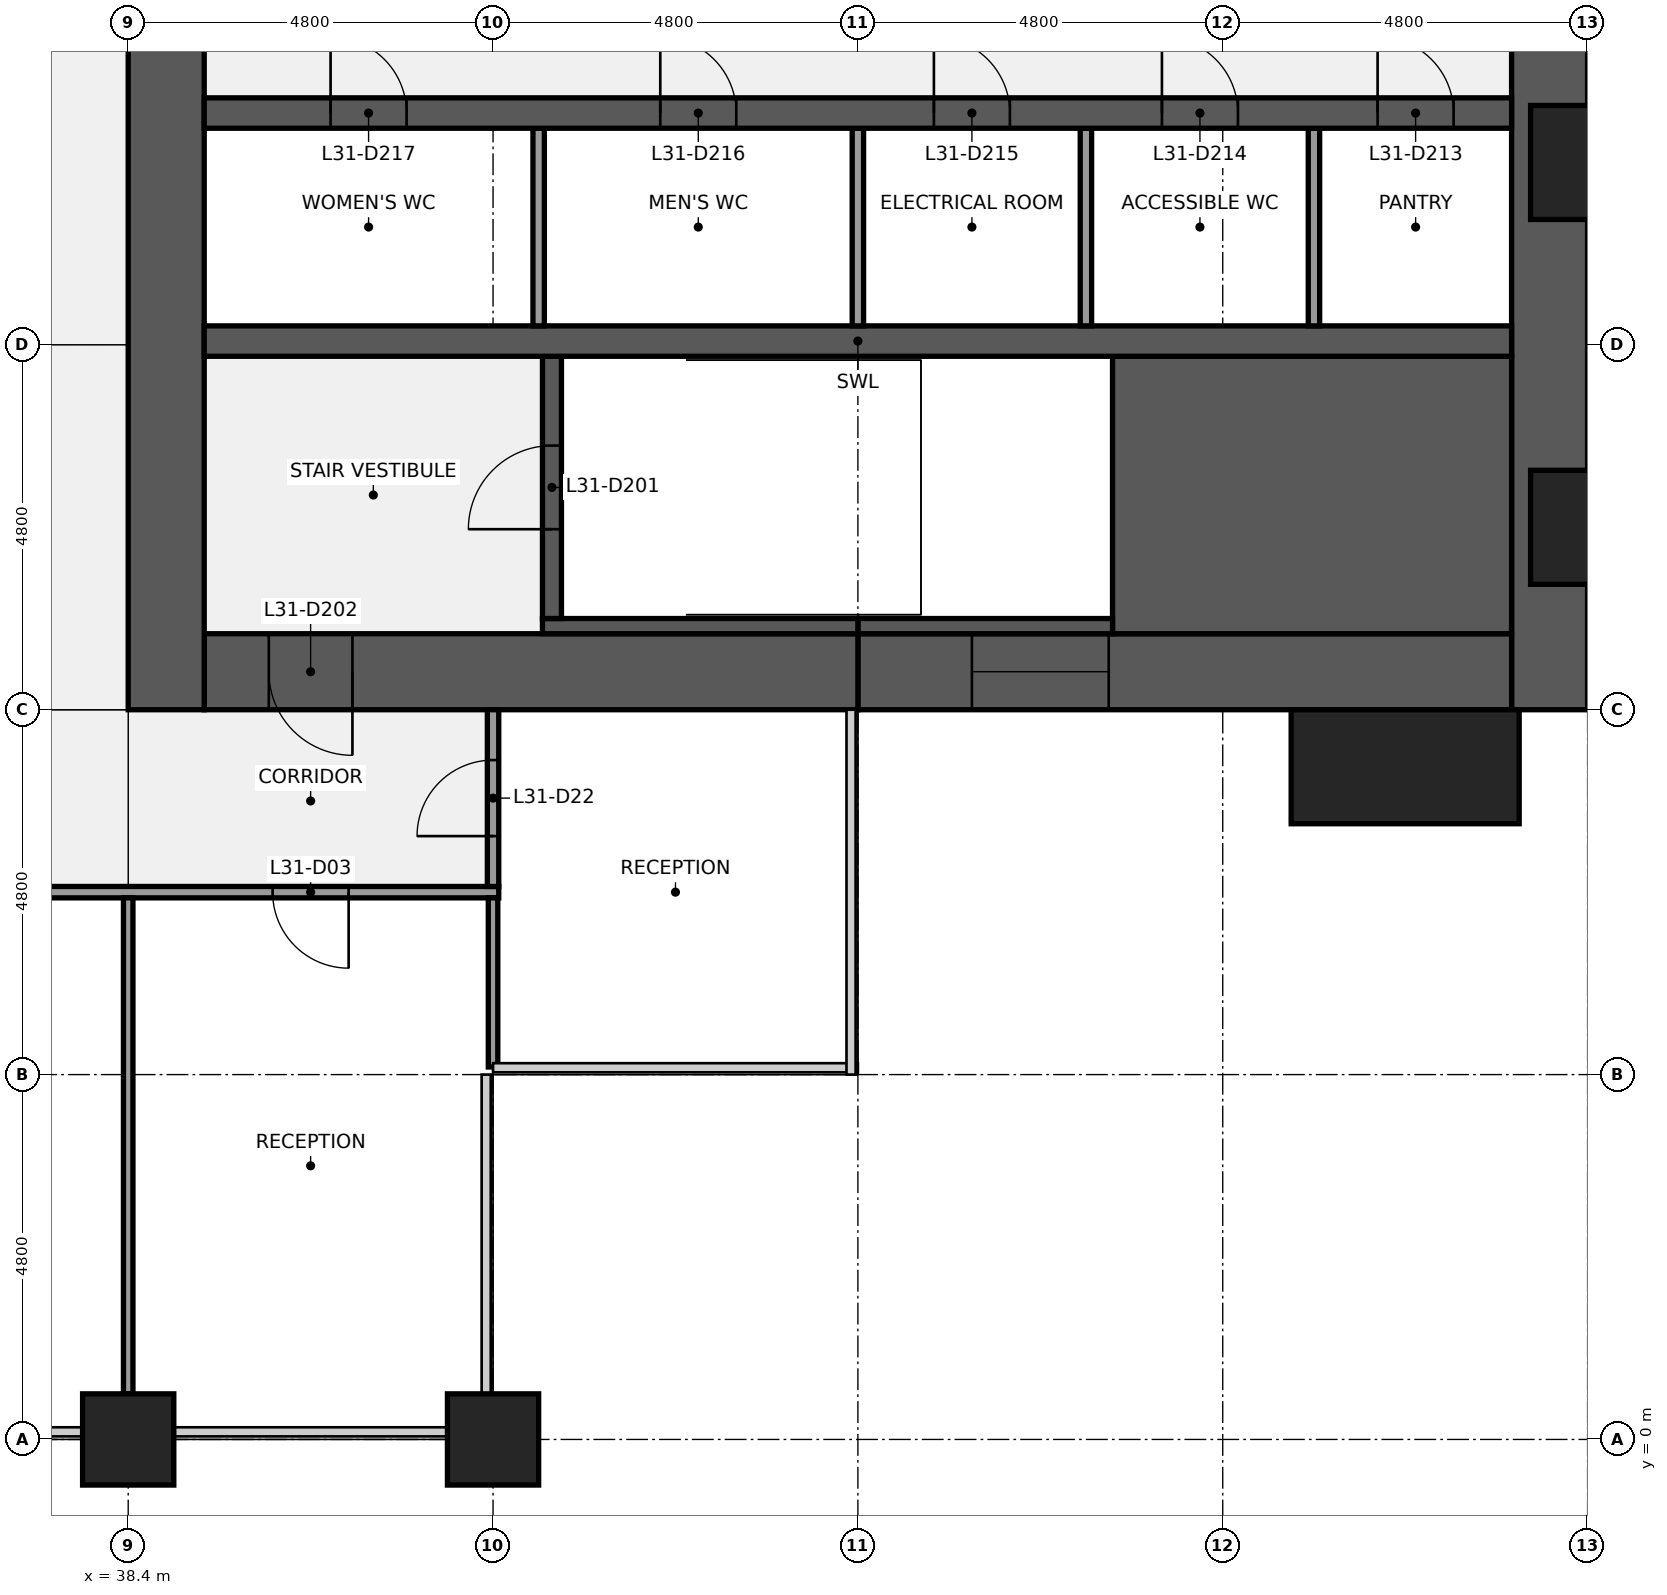
"""IFC4 building model, lengths in metres.
Left out: names, types, materials, properties, quantities, classifications, styles, units other than length and angle.
Written with IfcOpenShell. Run it as: python <this file> out.ifc"""

import sys

from ifc_helpers import new_model, si_unit, direction, frame, frame_2d, origin, origin_2d, place, context, subcontext, project, spatial, rectangle, extrude, element, fill, save


model = new_model("IFC4")
c1 = context("Model", 3, precision=1e-05, world=origin(), true_north=direction((0.0, 1.0)))
c2 = subcontext(c1, "Body", "Model", "MODEL_VIEW")
j1 = project(units=[si_unit("LENGTHUNIT", "METRE"), si_unit("PLANEANGLEUNIT", "RADIAN")], contexts=[c1])
p1 = place(None, origin())
s1 = spatial("IfcSite", under=j1, at=p1, CompositionType="ELEMENT")
p2 = place(p1, origin())
s2 = spatial("IfcBuilding", under=s1, at=p2, CompositionType="ELEMENT")
p3 = place(p2, frame((0.0, 0.0, 144.1)))
s3 = spatial("IfcBuildingStorey", under=s2, at=p3, CompositionType="ELEMENT", Elevation=144.1)
for number, where, z_axis, x_axis in (
    (1, (38.4, 0.0, 0.0), (0.0, 0.0, 1.0), (1.0, 0.0, 0.0)),
    (2, (43.2, 0.0, 0.0), (0.0, 0.0, 1.0), (1.0, 0.0, 0.0)),
):
    element("IfcColumn", number, at=place(p3, frame(where, z_axis=z_axis, x_axis=x_axis)), inside=s3, PredefinedType="COLUMN", context=c2, shape_type="SweptSolid", body=[
        extrude(rectangle(XDim=1.2, YDim=1.2, at=origin_2d()), origin(), (0.0, 0.0, 1.0), 4.0),
    ])
p4 = place(p3, frame((57.1, 38.4, 0.0), z_axis=(0.0, 0.0, 1.0), x_axis=(0.0, -1.0, 0.0)))
e3 = element("IfcWall", 3, at=p4, inside=s3, PredefinedType="SHEAR", context=c2, shape_type="SweptSolid", body=[
    extrude(rectangle(XDim=28.8, YDim=1.0, at=frame_2d((14.4, 0.0))), origin(), (0.0, 0.0, 1.0), 3.84),
])
p5 = place(p4, frame((18.45, 0.0, 0.9)))
e4 = element("IfcOpeningElement", 4, at=p5, cuts=e3, PredefinedType="OPENING", context=c2, shape_type="SweptSolid", body=[
    extrude(rectangle(XDim=1.5, YDim=1.5, at=frame_2d((0.75, 0.75))), frame((0.0, 0.51, 0.0), z_axis=(0.0, -1.0, 0.0), x_axis=(1.0, 0.0, 0.0)), (0.0, 0.0, 1.0), 1.02),
])
p6 = place(p4, frame((8.85, 0.0, 0.9)))
e5 = element("IfcOpeningElement", 5, at=p6, cuts=e3, PredefinedType="OPENING", context=c2, shape_type="SweptSolid", body=[
    extrude(rectangle(XDim=1.5, YDim=1.5, at=frame_2d((0.75, 0.75))), frame((0.0, 0.51, 0.0), z_axis=(0.0, -1.0, 0.0), x_axis=(1.0, 0.0, 0.0)), (0.0, 0.0, 1.0), 1.02),
])
p7 = place(p3, frame((56.6, 10.1, 0.0), z_axis=(0.0, 0.0, 1.0), x_axis=(-1.0, 0.0, 0.0)))
e6 = element("IfcWall", 6, at=p7, inside=s3, PredefinedType="SHEAR", context=c2, shape_type="SweptSolid", body=[
    extrude(rectangle(XDim=8.6, YDim=1.0, at=frame_2d((4.3, 0.0))), origin(), (0.0, 0.0, 1.0), 3.84),
])
p8 = place(p7, frame((5.3, 0.0, 0.9)))
e7 = element("IfcOpeningElement", 7, at=p8, cuts=e6, PredefinedType="OPENING", context=c2, shape_type="SweptSolid", body=[
    extrude(rectangle(XDim=1.8, YDim=1.5, at=frame_2d((0.9, 0.75))), frame((0.0, 0.51, 0.0), z_axis=(0.0, -1.0, 0.0), x_axis=(1.0, 0.0, 0.0)), (0.0, 0.0, 1.0), 1.02),
])
p9 = place(p3, frame((48.0, 10.1, 0.0), z_axis=(0.0, 0.0, 1.0), x_axis=(-1.0, 0.0, 0.0)))
e8 = element("IfcWall", 8, at=p9, inside=s3, PredefinedType="SHEAR", context=c2, shape_type="SweptSolid", body=[
    extrude(rectangle(XDim=8.6, YDim=1.0, at=frame_2d((4.3, 0.0))), origin(), (0.0, 0.0, 1.0), 3.84),
])
p10 = place(p9, frame((6.65, 0.0, 0.0)))
e9 = element("IfcOpeningElement", 9, at=p10, cuts=e8, PredefinedType="OPENING", context=c2, shape_type="SweptSolid", body=[
    extrude(rectangle(XDim=1.1, YDim=2.1, at=frame_2d((0.55, 1.05))), frame((0.0, 0.51, 0.0), z_axis=(0.0, -1.0, 0.0), x_axis=(1.0, 0.0, 0.0)), (0.0, 0.0, 1.0), 1.02),
])
p11 = place(p3, frame((38.9, 9.6, 0.0), z_axis=(0.0, 0.0, 1.0), x_axis=(0.0, 1.0, 0.0)))
e10 = element("IfcWall", 10, at=p11, inside=s3, PredefinedType="SHEAR", context=c2, shape_type="SweptSolid", body=[
    extrude(rectangle(XDim=28.8, YDim=1.0, at=frame_2d((14.4, 0.0))), origin(), (0.0, 0.0, 1.0), 3.84),
])
p12 = place(p11, frame((8.7, 0.0, 0.0)))
e11 = element("IfcOpeningElement", 11, at=p12, cuts=e10, PredefinedType="OPENING", context=c2, shape_type="SweptSolid", body=[
    extrude(rectangle(XDim=1.8, YDim=2.1, at=frame_2d((0.9, 1.05))), frame((0.0, 0.51, 0.0), z_axis=(0.0, -1.0, 0.0), x_axis=(1.0, 0.0, 0.0)), (0.0, 0.0, 1.0), 1.02),
])
p13 = place(p11, frame((18.3, 0.0, 0.0)))
e12 = element("IfcOpeningElement", 12, at=p13, cuts=e10, PredefinedType="OPENING", context=c2, shape_type="SweptSolid", body=[
    extrude(rectangle(XDim=1.8, YDim=2.1, at=frame_2d((0.9, 1.05))), frame((0.0, 0.51, 0.0), z_axis=(0.0, -1.0, 0.0), x_axis=(1.0, 0.0, 0.0)), (0.0, 0.0, 1.0), 1.02),
])
p14 = place(p3, frame((51.35, 12.425, 0.0), z_axis=(0.0, 0.0, 1.0), x_axis=(1.0, 0.0, 0.0)))
e13 = element("IfcWall", 13, at=p14, inside=s3, PredefinedType="SHEAR", context=c2, shape_type="SweptSolid", body=[
    extrude(rectangle(XDim=5.25, YDim=3.65, at=frame_2d((2.625, 0.0))), origin(), (0.0, 0.0, 1.0), 3.84),
])
p15 = place(p3, frame((48.0, 10.7, 0.0), z_axis=(0.0, 0.0, 1.0), x_axis=(1.0, 0.0, 0.0)))
e14 = element("IfcWall", 14, at=p15, inside=s3, PredefinedType="SHEAR", context=c2, shape_type="SweptSolid", body=[
    extrude(rectangle(XDim=3.35, YDim=0.2, at=frame_2d((1.675, 0.0))), origin(), (0.0, 0.0, 1.0), 3.84),
])
p16 = place(p3, frame((43.85, 10.7, 0.0), z_axis=(0.0, 0.0, 1.0), x_axis=(1.0, 0.0, 0.0)))
e15 = element("IfcWall", 15, at=p16, inside=s3, PredefinedType="SHEAR", context=c2, shape_type="SweptSolid", body=[
    extrude(rectangle(XDim=4.15, YDim=0.2, at=frame_2d((2.075, 0.0))), origin(), (0.0, 0.0, 1.0), 3.84),
])
p17 = place(p3, frame((43.975, 10.8, 0.0), z_axis=(0.0, 0.0, 1.0), x_axis=(0.0, 1.0, 0.0)))
e16 = element("IfcWall", 16, at=p17, inside=s3, PredefinedType="SHEAR", context=c2, shape_type="SweptSolid", body=[
    extrude(rectangle(XDim=3.45, YDim=0.25, at=frame_2d((1.725, 0.0))), origin(), (0.0, 0.0, 1.0), 3.84),
])
p18 = place(p17, frame((1.175, 0.0, 0.0)))
e17 = element("IfcOpeningElement", 17, at=p18, cuts=e16, PredefinedType="OPENING", context=c2, shape_type="SweptSolid", body=[
    extrude(rectangle(XDim=1.1, YDim=2.1, at=frame_2d((0.55, 1.05))), frame((0.0, 0.135, 0.0), z_axis=(0.0, -1.0, 0.0), x_axis=(1.0, 0.0, 0.0)), (0.0, 0.0, 1.0), 0.27),
])
p19 = place(p3, frame((39.4, 14.45, 0.0), z_axis=(0.0, 0.0, 1.0), x_axis=(1.0, 0.0, 0.0)))
e18 = element("IfcWall", 18, at=p19, inside=s3, PredefinedType="SHEAR", context=c2, shape_type="SweptSolid", body=[
    extrude(rectangle(XDim=17.2, YDim=0.4, at=frame_2d((8.6, 0.0))), origin(), (0.0, 0.0, 1.0), 3.84),
])
for number, where, z_axis, x_axis in (
    (19, (54.0, 14.65, 0.0), (0.0, 0.0, 1.0), (0.0, 1.0, 0.0)),
    (20, (51.0, 14.65, 0.0), (0.0, 0.0, 1.0), (0.0, 1.0, 0.0)),
    (21, (48.0, 14.65, 0.0), (0.0, 0.0, 1.0), (0.0, 1.0, 0.0)),
    (22, (43.8, 14.65, 0.0), (0.0, 0.0, 1.0), (0.0, 1.0, 0.0)),
):
    element("IfcWall", number, at=place(p3, frame(where, z_axis=z_axis, x_axis=x_axis)), inside=s3, PredefinedType="PARTITIONING", context=c2, shape_type="SweptSolid", body=[
        extrude(rectangle(XDim=2.6, YDim=0.15, at=frame_2d((1.3, 0.0))), origin(), (0.0, 0.0, 1.0), 3.84),
    ])
p20 = place(p3, frame((39.4, 17.45, 0.0), z_axis=(0.0, 0.0, 1.0), x_axis=(1.0, 0.0, 0.0)))
e23 = element("IfcWall", 23, at=p20, inside=s3, PredefinedType="SHEAR", context=c2, shape_type="SweptSolid", body=[
    extrude(rectangle(XDim=17.2, YDim=0.4, at=frame_2d((8.6, 0.0))), origin(), (0.0, 0.0, 1.0), 3.84),
])
p21 = place(p20, frame((15.438, 0.0, 0.0)))
e24 = element("IfcOpeningElement", 24, at=p21, cuts=e23, PredefinedType="OPENING", context=c2, shape_type="SweptSolid", body=[
    extrude(rectangle(XDim=1.0, YDim=2.1, at=frame_2d((0.5, 1.05))), frame((0.0, 0.21, 0.0), z_axis=(0.0, -1.0, 0.0), x_axis=(1.0, 0.0, 0.0)), (0.0, 0.0, 1.0), 0.42),
])
p22 = place(p20, frame((12.6, 0.0, 0.0)))
e25 = element("IfcOpeningElement", 25, at=p22, cuts=e23, PredefinedType="OPENING", context=c2, shape_type="SweptSolid", body=[
    extrude(rectangle(XDim=1.0, YDim=2.1, at=frame_2d((0.5, 1.05))), frame((0.0, 0.21, 0.0), z_axis=(0.0, -1.0, 0.0), x_axis=(1.0, 0.0, 0.0)), (0.0, 0.0, 1.0), 0.42),
])
p23 = place(p20, frame((9.6, 0.0, 0.0)))
e26 = element("IfcOpeningElement", 26, at=p23, cuts=e23, PredefinedType="OPENING", context=c2, shape_type="SweptSolid", body=[
    extrude(rectangle(XDim=1.0, YDim=2.1, at=frame_2d((0.5, 1.05))), frame((0.0, 0.21, 0.0), z_axis=(0.0, -1.0, 0.0), x_axis=(1.0, 0.0, 0.0)), (0.0, 0.0, 1.0), 0.42),
])
p24 = place(p20, frame((6.0, 0.0, 0.0)))
e27 = element("IfcOpeningElement", 27, at=p24, cuts=e23, PredefinedType="OPENING", context=c2, shape_type="SweptSolid", body=[
    extrude(rectangle(XDim=1.0, YDim=2.1, at=frame_2d((0.5, 1.05))), frame((0.0, 0.21, 0.0), z_axis=(0.0, -1.0, 0.0), x_axis=(1.0, 0.0, 0.0)), (0.0, 0.0, 1.0), 0.42),
])
p25 = place(p20, frame((1.663, 0.0, 0.0)))
e28 = element("IfcOpeningElement", 28, at=p25, cuts=e23, PredefinedType="OPENING", context=c2, shape_type="SweptSolid", body=[
    extrude(rectangle(XDim=1.0, YDim=2.1, at=frame_2d((0.5, 1.05))), frame((0.0, 0.21, 0.0), z_axis=(0.0, -1.0, 0.0), x_axis=(1.0, 0.0, 0.0)), (0.0, 0.0, 1.0), 0.42),
])
p26 = place(p3, frame((14.325, 7.2, 0.0), z_axis=(0.0, 0.0, 1.0), x_axis=(1.0, 0.0, 0.0)))
e29 = element("IfcWall", 29, at=p26, inside=s3, PredefinedType="PARTITIONING", context=c2, shape_type="SweptSolid", body=[
    extrude(rectangle(XDim=28.95, YDim=0.15, at=frame_2d((14.475, 0.0))), origin(), (0.0, 0.0, 1.0), 2.936),
])
p27 = place(p26, frame((1.975, 0.0, 0.0)))
e30 = element("IfcOpeningElement", 30, at=p27, cuts=e29, PredefinedType="OPENING", context=c2, shape_type="SweptSolid", body=[
    extrude(rectangle(XDim=1.0, YDim=2.1, at=frame_2d((0.5, 1.05))), frame((0.0, 0.085, 0.0), z_axis=(0.0, -1.0, 0.0), x_axis=(1.0, 0.0, 0.0)), (0.0, 0.0, 1.0), 0.17),
])
p28 = place(p26, frame((13.975, 0.0, 0.0)))
e31 = element("IfcOpeningElement", 31, at=p28, cuts=e29, PredefinedType="OPENING", context=c2, shape_type="SweptSolid", body=[
    extrude(rectangle(XDim=1.0, YDim=2.1, at=frame_2d((0.5, 1.05))), frame((0.0, 0.085, 0.0), z_axis=(0.0, -1.0, 0.0), x_axis=(1.0, 0.0, 0.0)), (0.0, 0.0, 1.0), 0.17),
])
p29 = place(p26, frame((25.975, 0.0, 0.0)))
e32 = element("IfcOpeningElement", 32, at=p29, cuts=e29, PredefinedType="OPENING", context=c2, shape_type="SweptSolid", body=[
    extrude(rectangle(XDim=1.0, YDim=2.1, at=frame_2d((0.5, 1.05))), frame((0.0, 0.085, 0.0), z_axis=(0.0, -1.0, 0.0), x_axis=(1.0, 0.0, 0.0)), (0.0, 0.0, 1.0), 0.17),
])
p30 = place(p3, frame((38.4, 0.6, 0.0), z_axis=(0.0, 0.0, 1.0), x_axis=(0.0, 1.0, 0.0)))
e33 = element("IfcWall", 33, at=p30, inside=s3, PredefinedType="PARTITIONING", context=c2, shape_type="SweptSolid", body=[
    extrude(rectangle(XDim=6.525, YDim=0.125, at=frame_2d((3.262, 0.0))), origin(), (0.0, 0.0, 1.0), 2.936),
])
p31 = place(p3, frame((43.2, 4.9, 0.0), z_axis=(0.0, 0.0, 1.0), x_axis=(0.0, 1.0, 0.0)))
e34 = element("IfcWall", 34, at=p31, inside=s3, PredefinedType="PARTITIONING", context=c2, shape_type="SweptSolid", body=[
    extrude(rectangle(XDim=2.225, YDim=0.125, at=frame_2d((1.113, 0.0))), origin(), (0.0, 0.0, 1.0), 2.936),
])
p32 = place(p3, frame((43.2, 7.275, 0.0), z_axis=(0.0, 0.0, 1.0), x_axis=(0.0, 1.0, 0.0)))
e35 = element("IfcWall", 35, at=p32, inside=s3, PredefinedType="PARTITIONING", context=c2, shape_type="SweptSolid", body=[
    extrude(rectangle(XDim=2.325, YDim=0.15, at=frame_2d((1.163, 0.0))), origin(), (0.0, 0.0, 1.0), 2.936),
])
p33 = place(p32, frame((0.663, 0.0, 0.0)))
e36 = element("IfcOpeningElement", 36, at=p33, cuts=e35, PredefinedType="OPENING", context=c2, shape_type="SweptSolid", body=[
    extrude(rectangle(XDim=1.0, YDim=2.1, at=frame_2d((0.5, 1.05))), frame((0.0, 0.085, 0.0), z_axis=(0.0, -1.0, 0.0), x_axis=(1.0, 0.0, 0.0)), (0.0, 0.0, 1.0), 0.17),
])
p34 = place(p3, frame((55.2, 8.85, 0.0), z_axis=(0.0, 0.0, 1.0), x_axis=(1.0, 0.0, 0.0)))
e37 = element("IfcColumn", 37, at=p34, inside=s3, PredefinedType="PILASTER", context=c2, shape_type="SweptSolid", body=[
    extrude(rectangle(XDim=3.0, YDim=1.5, at=origin_2d()), origin(), (0.0, 0.0, 1.0), 4.0),
])
for number, where, z_axis, x_axis in (
    (38, (38.4, -1.05, 0.0), (0.0, 0.0, 1.0), (1.0, 0.0, 0.0)),
    (39, (43.2, -1.05, 0.0), (0.0, 0.0, 1.0), (1.0, 0.0, 0.0)),
):
    element("IfcColumn", number, at=place(p3, frame(where, z_axis=z_axis, x_axis=x_axis)), inside=s3, PredefinedType="PILASTER", context=c2, shape_type="SweptSolid", body=[
        extrude(rectangle(XDim=3.6, YDim=0.9, at=origin_2d()), origin(), (0.0, 0.0, 1.0), 4.0),
    ])
p35 = place(p18, origin())
e40 = element("IfcDoor", 40, at=p35, inside=s3, OperationType="SINGLE_SWING_LEFT", PredefinedType="DOOR", context=c2, shape_type="SweptSolid", body=[
    extrude(rectangle(XDim=1.1, YDim=2.1, at=frame_2d((0.55, 1.05))), frame((0.0, 0.025, 0.0), z_axis=(0.0, -1.0, 0.0), x_axis=(1.0, 0.0, 0.0)), (0.0, 0.0, 1.0), 0.05),
])
fill(e17, e40)
p36 = place(p10, origin())
e41 = element("IfcDoor", 41, at=p36, inside=s3, OperationType="SINGLE_SWING_LEFT", PredefinedType="DOOR", context=c2, shape_type="SweptSolid", body=[
    extrude(rectangle(XDim=1.1, YDim=2.1, at=frame_2d((0.55, 1.05))), frame((0.0, 0.025, 0.0), z_axis=(0.0, -1.0, 0.0), x_axis=(1.0, 0.0, 0.0)), (0.0, 0.0, 1.0), 0.05),
])
fill(e9, e41)
p37 = place(p21, origin())
e42 = element("IfcDoor", 42, at=p37, inside=s3, OperationType="SINGLE_SWING_LEFT", PredefinedType="DOOR", context=c2, shape_type="SweptSolid", body=[
    extrude(rectangle(XDim=1.0, YDim=2.1, at=frame_2d((0.5, 1.05))), frame((0.0, 0.025, 0.0), z_axis=(0.0, -1.0, 0.0), x_axis=(1.0, 0.0, 0.0)), (0.0, 0.0, 1.0), 0.05),
])
fill(e24, e42)
p38 = place(p22, origin())
e43 = element("IfcDoor", 43, at=p38, inside=s3, OperationType="SINGLE_SWING_LEFT", PredefinedType="DOOR", context=c2, shape_type="SweptSolid", body=[
    extrude(rectangle(XDim=1.0, YDim=2.1, at=frame_2d((0.5, 1.05))), frame((0.0, 0.025, 0.0), z_axis=(0.0, -1.0, 0.0), x_axis=(1.0, 0.0, 0.0)), (0.0, 0.0, 1.0), 0.05),
])
fill(e25, e43)
p39 = place(p23, origin())
e44 = element("IfcDoor", 44, at=p39, inside=s3, OperationType="SINGLE_SWING_LEFT", PredefinedType="DOOR", context=c2, shape_type="SweptSolid", body=[
    extrude(rectangle(XDim=1.0, YDim=2.1, at=frame_2d((0.5, 1.05))), frame((0.0, 0.025, 0.0), z_axis=(0.0, -1.0, 0.0), x_axis=(1.0, 0.0, 0.0)), (0.0, 0.0, 1.0), 0.05),
])
fill(e26, e44)
p40 = place(p24, origin())
e45 = element("IfcDoor", 45, at=p40, inside=s3, OperationType="SINGLE_SWING_LEFT", PredefinedType="DOOR", context=c2, shape_type="SweptSolid", body=[
    extrude(rectangle(XDim=1.0, YDim=2.1, at=frame_2d((0.5, 1.05))), frame((0.0, 0.025, 0.0), z_axis=(0.0, -1.0, 0.0), x_axis=(1.0, 0.0, 0.0)), (0.0, 0.0, 1.0), 0.05),
])
fill(e27, e45)
p41 = place(p25, origin())
e46 = element("IfcDoor", 46, at=p41, inside=s3, OperationType="SINGLE_SWING_LEFT", PredefinedType="DOOR", context=c2, shape_type="SweptSolid", body=[
    extrude(rectangle(XDim=1.0, YDim=2.1, at=frame_2d((0.5, 1.05))), frame((0.0, 0.025, 0.0), z_axis=(0.0, -1.0, 0.0), x_axis=(1.0, 0.0, 0.0)), (0.0, 0.0, 1.0), 0.05),
])
fill(e28, e46)
p42 = place(p8, origin())
e47 = element("IfcWindow", 47, at=p42, inside=s3, PartitioningType="SINGLE_PANEL", PredefinedType="WINDOW", context=c2, shape_type="SweptSolid", body=[
    extrude(rectangle(XDim=1.8, YDim=1.5, at=frame_2d((0.9, 0.75))), frame((0.0, 0.03, 0.0), z_axis=(0.0, -1.0, 0.0), x_axis=(1.0, 0.0, 0.0)), (0.0, 0.0, 1.0), 0.06),
])
fill(e7, e47)
p43 = place(p29, origin())
e48 = element("IfcDoor", 48, at=p43, inside=s3, OperationType="SINGLE_SWING_RIGHT", PredefinedType="DOOR", context=c2, shape_type="SweptSolid", body=[
    extrude(rectangle(XDim=1.0, YDim=2.1, at=frame_2d((0.5, 1.05))), frame((0.0, 0.025, 0.0), z_axis=(0.0, -1.0, 0.0), x_axis=(1.0, 0.0, 0.0)), (0.0, 0.0, 1.0), 0.05),
])
fill(e32, e48)
p44 = place(p33, origin())
e49 = element("IfcDoor", 49, at=p44, inside=s3, OperationType="SINGLE_SWING_LEFT", PredefinedType="DOOR", context=c2, shape_type="SweptSolid", body=[
    extrude(rectangle(XDim=1.0, YDim=2.1, at=frame_2d((0.5, 1.05))), frame((0.0, 0.025, 0.0), z_axis=(0.0, -1.0, 0.0), x_axis=(1.0, 0.0, 0.0)), (0.0, 0.0, 1.0), 0.05),
])
fill(e36, e49)
save(model, sys.argv[1])
